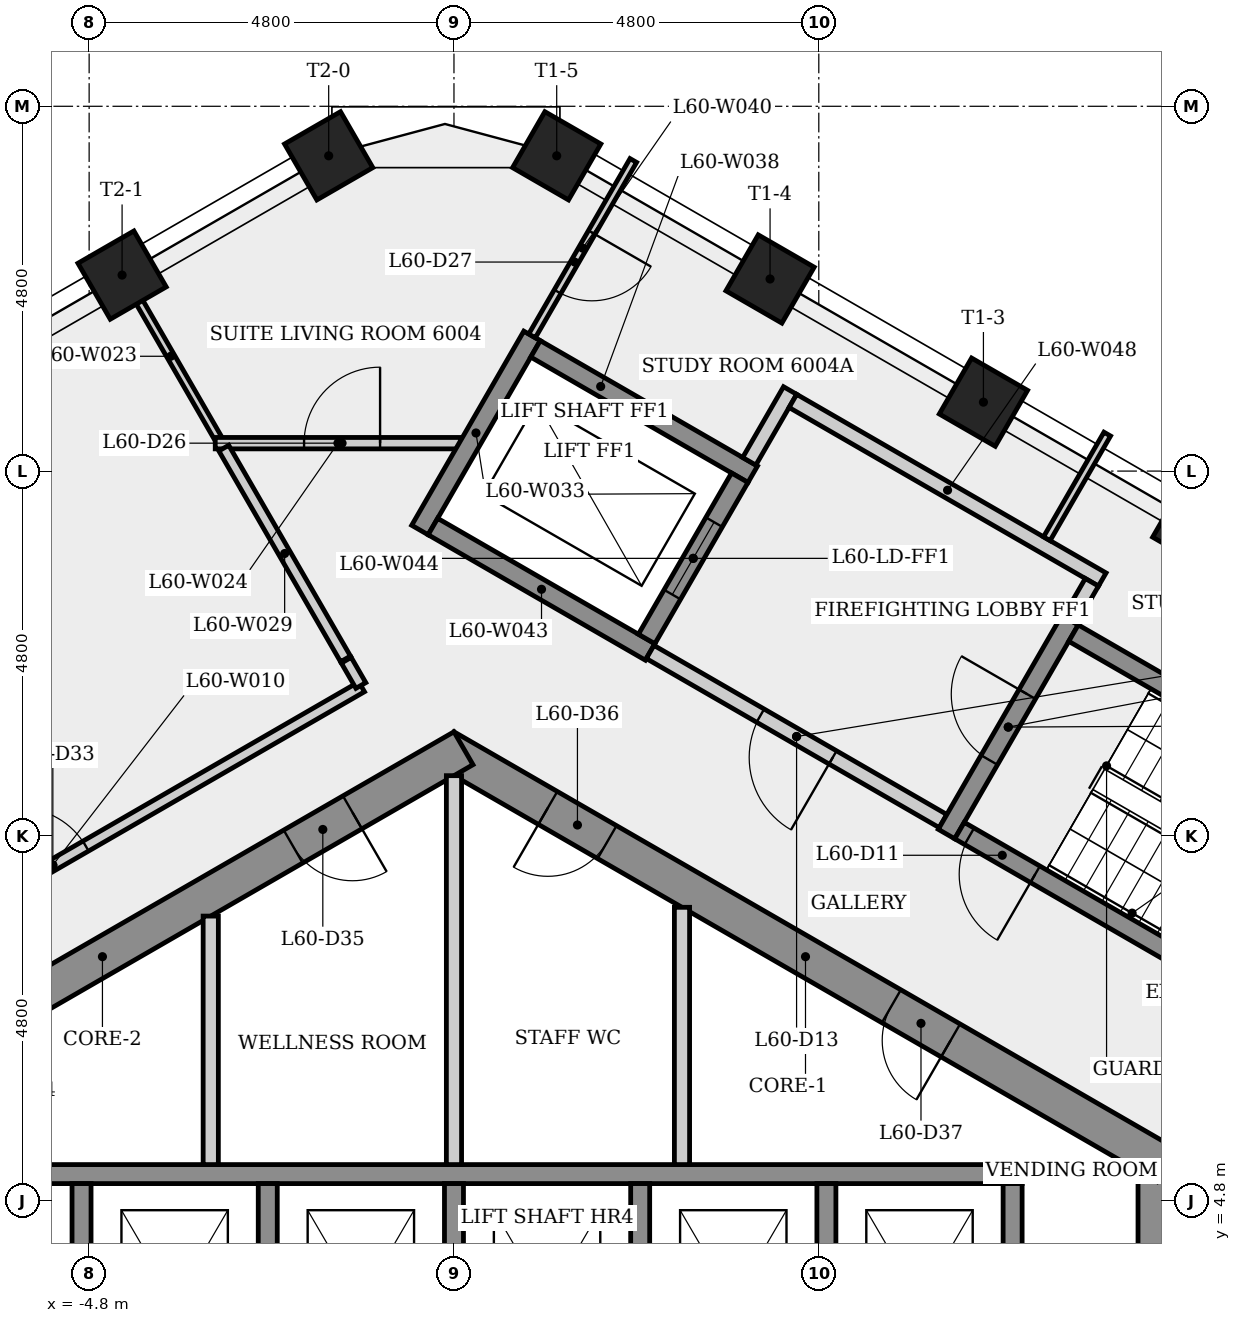
"""IFC4 building model, lengths in metres.
Left out: names, types, materials, properties, quantities, classifications, styles, units other than length and angle.
Written with IfcOpenShell. Run it as: python <this file> out.ifc"""

import sys

from ifc_helpers import new_model, si_unit, direction, frame, frame_2d, origin, origin_2d, place, context, subcontext, project, spatial, rectangle, extrude, element, fill, save


model = new_model("IFC4")
c1 = context("Model", 3, precision=1e-05, world=origin(), true_north=direction((0.0, 1.0)))
c2 = subcontext(c1, "Body", "Model", "MODEL_VIEW")
j1 = project(units=[si_unit("LENGTHUNIT", "METRE"), si_unit("PLANEANGLEUNIT", "RADIAN")], contexts=[c1])
p1 = place(None, origin())
s1 = spatial("IfcSite", under=j1, at=p1, CompositionType="ELEMENT")
p2 = place(p1, origin())
s2 = spatial("IfcBuilding", under=s1, at=p2, CompositionType="ELEMENT")
p3 = place(p2, frame((0.0, 0.0, 225.7)))
s3 = spatial("IfcBuildingStorey", under=s2, at=p3, CompositionType="ELEMENT", Elevation=225.7)
p4 = place(p3, frame((9.25, -5.485, 0.0), z_axis=(0.0, 0.0, 1.0), x_axis=(0.0, 1.0, 0.0)))
e1 = element("IfcWall", 1, at=p4, inside=s3, PredefinedType="SHEAR", context=c2, shape_type="SweptSolid", body=[
    extrude(rectangle(XDim=10.97, YDim=0.5, at=frame_2d((5.485, 0.0))), origin(), (0.0, 0.0, 1.0), 3.4),
])
p5 = place(p4, frame((4.685, 0.0, 0.0)))
e2 = element("IfcOpeningElement", 2, at=p5, cuts=e1, PredefinedType="OPENING", context=c2, shape_type="SweptSolid", body=[
    extrude(rectangle(XDim=1.6, YDim=2.1, at=frame_2d((0.8, 1.05))), frame((0.0, 0.26, 0.0), z_axis=(0.0, -1.0, 0.0), x_axis=(1.0, 0.0, 0.0)), (0.0, 0.0, 1.0), 0.52),
])
p6 = place(p3, frame((9.375, 5.268, 0.0), z_axis=(0.0, 0.0, 1.0), x_axis=(-0.866023993627, 0.500002442456, 0.0)))
e3 = element("IfcWall", 3, at=p6, inside=s3, PredefinedType="SHEAR", context=c2, shape_type="SweptSolid", body=[
    extrude(rectangle(XDim=10.97, YDim=0.5, at=frame_2d((5.485, 0.0))), origin(), (0.0, 0.0, 1.0), 3.4),
])
p7 = place(p6, frame((8.5, 0.0, 0.0)))
e4 = element("IfcOpeningElement", 4, at=p7, cuts=e3, PredefinedType="OPENING", context=c2, shape_type="SweptSolid", body=[
    extrude(rectangle(XDim=0.9, YDim=2.1, at=frame_2d((0.45, 1.05))), frame((0.0, 0.26, 0.0), z_axis=(0.0, -1.0, 0.0), x_axis=(1.0, 0.0, 0.0)), (0.0, 0.0, 1.0), 0.52),
])
p8 = place(p6, frame((3.28, 0.0, 0.0)))
e5 = element("IfcOpeningElement", 5, at=p8, cuts=e3, PredefinedType="OPENING", context=c2, shape_type="SweptSolid", body=[
    extrude(rectangle(XDim=0.9, YDim=2.1, at=frame_2d((0.45, 1.05))), frame((0.0, 0.26, 0.0), z_axis=(0.0, -1.0, 0.0), x_axis=(1.0, 0.0, 0.0)), (0.0, 0.0, 1.0), 0.52),
])
p9 = place(p3, frame((0.125, 10.753, 0.0), z_axis=(0.0, 0.0, 1.0), x_axis=(-0.866023993627, -0.500002442456, 0.0)))
e6 = element("IfcWall", 6, at=p9, inside=s3, PredefinedType="SHEAR", context=c2, shape_type="SweptSolid", body=[
    extrude(rectangle(XDim=10.97, YDim=0.5, at=frame_2d((5.485, 0.0))), origin(), (0.0, 0.0, 1.0), 3.4),
])
p10 = place(p9, frame((8.581, 0.0, 0.0)))
e7 = element("IfcOpeningElement", 7, at=p10, cuts=e6, PredefinedType="OPENING", context=c2, shape_type="SweptSolid", body=[
    extrude(rectangle(XDim=0.9, YDim=2.1, at=frame_2d((0.45, 1.05))), frame((0.0, 0.26, 0.0), z_axis=(0.0, -1.0, 0.0), x_axis=(1.0, 0.0, 0.0)), (0.0, 0.0, 1.0), 0.52),
])
p11 = place(p9, frame((1.687, 0.0, 0.0)))
e8 = element("IfcOpeningElement", 8, at=p11, cuts=e6, PredefinedType="OPENING", context=c2, shape_type="SweptSolid", body=[
    extrude(rectangle(XDim=0.9, YDim=2.1, at=frame_2d((0.45, 1.05))), frame((0.0, 0.26, 0.0), z_axis=(0.0, -1.0, 0.0), x_axis=(1.0, 0.0, 0.0)), (0.0, 0.0, 1.0), 0.52),
])
for number, where, z_axis, x_axis in (
    (9, (9.773, 13.686, 0.0), (0.0, 0.0, 1.0), (0.5, 0.866, 0.0)),
    (10, (6.966, 15.307, 0.0), (0.0, 0.0, 1.0), (0.5, 0.866, 0.0)),
    (11, (4.159, 16.927, 0.0), (0.0, 0.0, 1.0), (0.5, 0.866, 0.0)),
    (12, (1.352, 18.548, 0.0), (0.0, 0.0, 1.0), (0.5, 0.866, 0.0)),
    (13, (-1.648, 18.548, 0.0), (0.0, 0.0, 1.0), (-0.5, 0.866, 0.0)),
    (14, (-4.366, 16.979, 0.0), (0.0, 0.0, 1.0), (-0.5, 0.866, 0.0)),
):
    element("IfcColumn", number, at=place(p3, frame(where, z_axis=z_axis, x_axis=x_axis)), inside=s3, PredefinedType="COLUMN", context=c2, shape_type="SweptSolid", body=[
        extrude(rectangle(XDim=0.85, YDim=0.85, at=origin_2d()), origin(), (0.0, 0.0, 1.0), 3.4),
    ])
p12 = place(p3, frame((-9.34, 6.87, 0.0), z_axis=(0.0, 0.0, 1.0), x_axis=(0.866023086118, 0.500004014295, 0.0)))
e15 = element("IfcWall", 15, at=p12, inside=s3, PredefinedType="PARTITIONING", context=c2, shape_type="SweptSolid", body=[
    extrude(rectangle(XDim=9.382, YDim=0.15, at=frame_2d((4.691, 0.0))), origin(), (0.0, 0.0, 1.0), 3.05),
])
p13 = place(p12, frame((4.191, 0.0, 0.0)))
e16 = element("IfcOpeningElement", 16, at=p13, cuts=e15, PredefinedType="OPENING", context=c2, shape_type="SweptSolid", body=[
    extrude(rectangle(XDim=1.0, YDim=2.1, at=frame_2d((0.5, 1.05))), frame((0.0, 0.085, 0.0), z_axis=(0.0, -1.0, 0.0), x_axis=(1.0, 0.0, 0.0)), (0.0, 0.0, 1.0), 0.17),
])
p14 = place(p3, frame((-7.225, 5.15, 0.0), z_axis=(0.0, 0.0, 1.0), x_axis=(1.0, 0.0, 0.0)))
e17 = element("IfcWall", 17, at=p14, inside=s3, PredefinedType="SHEAR", context=c2, shape_type="SweptSolid", body=[
    extrude(rectangle(XDim=14.7, YDim=0.25, at=frame_2d((7.35, 0.0))), origin(), (0.0, 0.0, 1.0), 3.05),
])
p15 = place(p3, frame((-4.9, 5.025, 0.0), z_axis=(0.0, 0.0, 1.0), x_axis=(0.0, -1.0, 0.0)))
e18 = element("IfcWall", 18, at=p15, inside=s3, PredefinedType="SHEAR", context=c2, shape_type="SweptSolid", body=[
    extrude(rectangle(XDim=3.1, YDim=0.25, at=frame_2d((1.55, 0.0))), origin(), (0.0, 0.0, 1.0), 3.4),
])
p16 = place(p3, frame((-3.2, 8.545, 0.0), z_axis=(0.0, 0.0, 1.0), x_axis=(0.0, -1.0, 0.0)))
e19 = element("IfcWall", 19, at=p16, inside=s3, PredefinedType="PARTITIONING", context=c2, shape_type="SweptSolid", body=[
    extrude(rectangle(XDim=3.27, YDim=0.2, at=frame_2d((1.635, 0.0))), origin(), (0.0, 0.0, 1.0), 3.05),
])
p17 = place(p3, frame((-3.104, 14.832, 0.0), z_axis=(0.0, 0.0, 1.0), x_axis=(-0.499934593286, 0.866063163075, 0.0)))
e20 = element("IfcWall", 20, at=p17, inside=s3, PredefinedType="PARTITIONING", context=c2, shape_type="SweptSolid", body=[
    extrude(rectangle(XDim=2.49, YDim=0.1, at=frame_2d((1.245, 0.0))), origin(), (0.0, 0.0, 1.0), 3.05),
])
p18 = place(p3, frame((-3.141, 14.767, 0.0), z_axis=(0.0, 0.0, 1.0), x_axis=(1.0, 0.0, 0.0)))
e21 = element("IfcWall", 21, at=p18, inside=s3, PredefinedType="PARTITIONING", context=c2, shape_type="SweptSolid", body=[
    extrude(rectangle(XDim=3.228, YDim=0.15, at=frame_2d((1.614, 0.0))), origin(), (0.0, 0.0, 1.0), 3.05),
])
p19 = place(p18, frame((1.169, 0.0, 0.0)))
e22 = element("IfcOpeningElement", 22, at=p19, cuts=e21, PredefinedType="OPENING", context=c2, shape_type="SweptSolid", body=[
    extrude(rectangle(XDim=1.0, YDim=2.1, at=frame_2d((0.5, 1.05))), frame((0.0, 0.085, 0.0), z_axis=(0.0, -1.0, 0.0), x_axis=(1.0, 0.0, 0.0)), (0.0, 0.0, 1.0), 0.17),
])
p20 = place(p3, frame((-2.45, 5.025, 0.0), z_axis=(0.0, 0.0, 1.0), x_axis=(0.0, -1.0, 0.0)))
e23 = element("IfcWall", 23, at=p20, inside=s3, PredefinedType="SHEAR", context=c2, shape_type="SweptSolid", body=[
    extrude(rectangle(XDim=3.1, YDim=0.25, at=frame_2d((1.55, 0.0))), origin(), (0.0, 0.0, 1.0), 3.4),
])
p21 = place(p3, frame((-1.427, 11.928, 0.0), z_axis=(0.0, 0.0, 1.0), x_axis=(-0.499951191736, 0.866053581415, 0.0)))
e24 = element("IfcWall", 24, at=p21, inside=s3, PredefinedType="PARTITIONING", context=c2, shape_type="SweptSolid", body=[
    extrude(rectangle(XDim=3.203, YDim=0.15, at=frame_2d((1.602, 0.0))), origin(), (0.0, 0.0, 1.0), 3.05),
])
p22 = place(p3, frame((-1.417, 11.911, 0.0), z_axis=(0.0, 0.0, 1.0), x_axis=(0.500107979177, -0.865963053002, 0.0)))
e25 = element("IfcWall", 25, at=p22, inside=s3, PredefinedType="PARTITIONING", context=c2, shape_type="SweptSolid", body=[
    extrude(rectangle(XDim=0.384, YDim=0.15, at=frame_2d((0.192, 0.0))), origin(), (0.0, 0.0, 1.0), 3.05),
])
p23 = place(p3, frame((-0.448, 13.624, 0.0), z_axis=(0.0, 0.0, 1.0), x_axis=(0.500037662692, 0.866003658127, 0.0)))
e26 = element("IfcWall", 26, at=p23, inside=s3, PredefinedType="SHEAR", context=c2, shape_type="SweptSolid", body=[
    extrude(rectangle(XDim=2.95, YDim=0.25, at=frame_2d((1.475, 0.0))), origin(), (0.0, 0.0, 1.0), 3.05),
])
p24 = place(p3, frame((0.0, 5.025, 0.0), z_axis=(0.0, 0.0, 1.0), x_axis=(0.0, -1.0, 0.0)))
e27 = element("IfcWall", 27, at=p24, inside=s3, PredefinedType="SHEAR", context=c2, shape_type="SweptSolid", body=[
    extrude(rectangle(XDim=3.1, YDim=0.25, at=frame_2d((1.55, 0.0))), origin(), (0.0, 0.0, 1.0), 3.4),
])
p25 = place(p3, frame((0.0, 10.392, 0.0), z_axis=(0.0, 0.0, 1.0), x_axis=(0.0, -1.0, 0.0)))
e28 = element("IfcWall", 28, at=p25, inside=s3, PredefinedType="PARTITIONING", context=c2, shape_type="SweptSolid", body=[
    extrude(rectangle(XDim=5.117, YDim=0.2, at=frame_2d((2.559, 0.0))), origin(), (0.0, 0.0, 1.0), 3.05),
])
p26 = place(p3, frame((1.073, 16.008, 0.0), z_axis=(0.0, 0.0, 1.0), x_axis=(0.866040211805, -0.499974350878, 0.0)))
e29 = element("IfcWall", 29, at=p26, inside=s3, PredefinedType="SHEAR", context=c2, shape_type="SweptSolid", body=[
    extrude(rectangle(XDim=3.3, YDim=0.25, at=frame_2d((1.65, 0.0))), origin(), (0.0, 0.0, 1.0), 3.05),
])
p27 = place(p3, frame((2.36, 18.487, 0.0), z_axis=(0.0, 0.0, 1.0), x_axis=(-0.500021155841, -0.86601318911, 0.0)))
e30 = element("IfcWall", 30, at=p27, inside=s3, PredefinedType="PARTITIONING", context=c2, shape_type="SweptSolid", body=[
    extrude(rectangle(XDim=2.665, YDim=0.1, at=frame_2d((1.333, 0.0))), origin(), (0.0, 0.0, 1.0), 3.05),
])
p28 = place(p27, frame((1.093, 0.0, 0.0)))
e31 = element("IfcOpeningElement", 31, at=p28, cuts=e30, PredefinedType="OPENING", context=c2, shape_type="SweptSolid", body=[
    extrude(rectangle(XDim=0.9, YDim=2.1, at=frame_2d((0.45, 1.05))), frame((0.0, 0.06, 0.0), z_axis=(0.0, -1.0, 0.0), x_axis=(1.0, 0.0, 0.0)), (0.0, 0.0, 1.0), 0.12),
])
p29 = place(p3, frame((2.45, 5.025, 0.0), z_axis=(0.0, 0.0, 1.0), x_axis=(0.0, -1.0, 0.0)))
e32 = element("IfcWall", 32, at=p29, inside=s3, PredefinedType="SHEAR", context=c2, shape_type="SweptSolid", body=[
    extrude(rectangle(XDim=3.1, YDim=0.25, at=frame_2d((1.55, 0.0))), origin(), (0.0, 0.0, 1.0), 3.4),
])
p30 = place(p3, frame((2.581, 12.02, 0.0), z_axis=(0.0, 0.0, 1.0), x_axis=(-0.866040211805, 0.499974350878, 0.0)))
e33 = element("IfcWall", 33, at=p30, inside=s3, PredefinedType="SHEAR", context=c2, shape_type="SweptSolid", body=[
    extrude(rectangle(XDim=3.3, YDim=0.25, at=frame_2d((1.65, 0.0))), origin(), (0.0, 0.0, 1.0), 3.05),
])
p31 = place(p3, frame((2.535, 12.191, 0.0), z_axis=(0.0, 0.0, 1.0), x_axis=(0.500061746146, 0.865989751695, 0.0)))
e34 = element("IfcWall", 34, at=p31, inside=s3, PredefinedType="SHEAR", context=c2, shape_type="SweptSolid", body=[
    extrude(rectangle(XDim=2.45, YDim=0.25, at=frame_2d((1.225, 0.0))), origin(), (0.0, 0.0, 1.0), 3.4),
])
p32 = place(p31, frame((0.675, 0.0, 0.0)))
e35 = element("IfcOpeningElement", 35, at=p32, cuts=e34, PredefinedType="OPENING", context=c2, shape_type="SweptSolid", body=[
    extrude(rectangle(XDim=1.1, YDim=2.1, at=frame_2d((0.55, 1.05))), frame((0.0, 0.135, 0.0), z_axis=(0.0, -1.0, 0.0), x_axis=(1.0, 0.0, 0.0)), (0.0, 0.0, 1.0), 0.27),
])
p33 = place(p3, frame((3.0, 8.66, 0.0), z_axis=(0.0, 0.0, 1.0), x_axis=(0.0, -1.0, 0.0)))
e36 = element("IfcWall", 36, at=p33, inside=s3, PredefinedType="PARTITIONING", context=c2, shape_type="SweptSolid", body=[
    extrude(rectangle(XDim=3.385, YDim=0.2, at=frame_2d((1.693, 0.0))), origin(), (0.0, 0.0, 1.0), 3.05),
])
p34 = place(p3, frame((3.885, 14.529, 0.0), z_axis=(0.0, 0.0, 1.0), x_axis=(0.499997628298, 0.866026773083, 0.0)))
e37 = element("IfcWall", 37, at=p34, inside=s3, PredefinedType="PARTITIONING", context=c2, shape_type="SweptSolid", body=[
    extrude(rectangle(XDim=1.075, YDim=0.2, at=frame_2d((0.538, 0.0))), origin(), (0.0, 0.0, 1.0), 3.05),
])
p35 = place(p3, frame((4.459, 15.323, 0.0), z_axis=(0.0, 0.0, 1.0), x_axis=(0.866016039709, -0.500016218704, 0.0)))
e38 = element("IfcWall", 38, at=p35, inside=s3, PredefinedType="PARTITIONING", context=c2, shape_type="SweptSolid", body=[
    extrude(rectangle(XDim=4.7, YDim=0.2, at=frame_2d((2.35, 0.0))), origin(), (0.0, 0.0, 1.0), 3.05),
])
p36 = place(p3, frame((4.9, 5.025, 0.0), z_axis=(0.0, 0.0, 1.0), x_axis=(0.0, -1.0, 0.0)))
e39 = element("IfcWall", 39, at=p36, inside=s3, PredefinedType="SHEAR", context=c2, shape_type="SweptSolid", body=[
    extrude(rectangle(XDim=3.1, YDim=0.25, at=frame_2d((1.55, 0.0))), origin(), (0.0, 0.0, 1.0), 3.4),
])
p37 = place(p3, frame((6.435, 9.795, 0.0), z_axis=(0.0, 0.0, 1.0), x_axis=(-0.866012907634, 0.500021643343, 0.0)))
e40 = element("IfcWall", 40, at=p37, inside=s3, PredefinedType="PARTITIONING", context=c2, shape_type="SweptSolid", body=[
    extrude(rectangle(XDim=4.45, YDim=0.2, at=frame_2d((2.225, 0.0))), origin(), (0.0, 0.0, 1.0), 3.05),
])
p38 = place(p37, frame((1.675, 0.0, 0.0)))
e41 = element("IfcOpeningElement", 41, at=p38, cuts=e40, PredefinedType="OPENING", context=c2, shape_type="SweptSolid", body=[
    extrude(rectangle(XDim=1.1, YDim=2.1, at=frame_2d((0.55, 1.05))), frame((0.0, 0.11, 0.0), z_axis=(0.0, -1.0, 0.0), x_axis=(1.0, 0.0, 0.0)), (0.0, 0.0, 1.0), 0.22),
])
p39 = place(p3, frame((6.48, 9.624, 0.0), z_axis=(0.0, 0.0, 1.0), x_axis=(0.500017246033, 0.866015446554, 0.0)))
e42 = element("IfcWall", 42, at=p39, inside=s3, PredefinedType="SHEAR", context=c2, shape_type="SweptSolid", body=[
    extrude(rectangle(XDim=3.25, YDim=0.25, at=frame_2d((1.625, 0.0))), origin(), (0.0, 0.0, 1.0), 3.05),
])
p40 = place(p39, frame((1.125, 0.0, 0.0)))
e43 = element("IfcOpeningElement", 43, at=p40, cuts=e42, PredefinedType="OPENING", context=c2, shape_type="SweptSolid", body=[
    extrude(rectangle(XDim=1.0, YDim=2.1, at=frame_2d((0.5, 1.05))), frame((0.0, 0.135, 0.0), z_axis=(0.0, -1.0, 0.0), x_axis=(1.0, 0.0, 0.0)), (0.0, 0.0, 1.0), 0.27),
])
p41 = place(p3, frame((7.35, 5.025, 0.0), z_axis=(0.0, 0.0, 1.0), x_axis=(0.0, -1.0, 0.0)))
e44 = element("IfcWall", 44, at=p41, inside=s3, PredefinedType="SHEAR", context=c2, shape_type="SweptSolid", body=[
    extrude(rectangle(XDim=3.1, YDim=0.25, at=frame_2d((1.55, 0.0))), origin(), (0.0, 0.0, 1.0), 3.4),
])
p42 = place(p3, frame((7.8, 13.51, 0.0), z_axis=(0.0, 0.0, 1.0), x_axis=(0.500037068326, 0.866004001318, 0.0)))
e45 = element("IfcWall", 45, at=p42, inside=s3, PredefinedType="PARTITIONING", context=c2, shape_type="SweptSolid", body=[
    extrude(rectangle(XDim=1.59, YDim=0.1, at=frame_2d((0.795, 0.0))), origin(), (0.0, 0.0, 1.0), 3.05),
])
p43 = place(p3, frame((8.151, 12.268, 0.0), z_axis=(0.0, 0.0, 1.0), x_axis=(0.866025499775, -0.499999833739, 0.0)))
e46 = element("IfcWall", 46, at=p43, inside=s3, PredefinedType="SHEAR", context=c2, shape_type="SweptSolid", body=[
    extrude(rectangle(XDim=6.4, YDim=0.25, at=frame_2d((3.2, 0.0))), origin(), (0.0, 0.0, 1.0), 3.05),
])
p44 = place(p3, frame((8.393, 12.937, 0.0), z_axis=(0.0, 0.0, 1.0), x_axis=(-0.500065409566, -0.86598763626, 0.0)))
e47 = element("IfcWall", 47, at=p44, inside=s3, PredefinedType="PARTITIONING", context=c2, shape_type="SweptSolid", body=[
    extrude(rectangle(XDim=0.575, YDim=0.2, at=frame_2d((0.288, 0.0))), origin(), (0.0, 0.0, 1.0), 3.05),
])
p45 = place(p3, frame((12.194, 6.47, 0.0), z_axis=(0.0, 0.0, 1.0), x_axis=(-0.866025499775, 0.499999833739, 0.0)))
e48 = element("IfcWall", 48, at=p45, inside=s3, PredefinedType="SHEAR", context=c2, shape_type="SweptSolid", body=[
    extrude(rectangle(XDim=6.4, YDim=0.25, at=frame_2d((3.2, 0.0))), origin(), (0.0, 0.0, 1.0), 3.05),
])
p46 = place(p45, frame((5.25, 0.0, 0.0)))
e49 = element("IfcOpeningElement", 49, at=p46, cuts=e48, PredefinedType="OPENING", context=c2, shape_type="SweptSolid", body=[
    extrude(rectangle(XDim=1.0, YDim=2.1, at=frame_2d((0.5, 1.05))), frame((0.0, 0.135, 0.0), z_axis=(0.0, -1.0, 0.0), x_axis=(1.0, 0.0, 0.0)), (0.0, 0.0, 1.0), 0.27),
])
p47 = place(p46, origin())
e50 = element("IfcDoor", 50, at=p47, inside=s3, OperationType="SINGLE_SWING_LEFT", PredefinedType="DOOR", context=c2, shape_type="SweptSolid", body=[
    extrude(rectangle(XDim=1.0, YDim=2.1, at=frame_2d((0.5, 1.05))), frame((0.0, 0.025, 0.0), z_axis=(0.0, -1.0, 0.0), x_axis=(1.0, 0.0, 0.0)), (0.0, 0.0, 1.0), 0.05),
])
fill(e49, e50)
p48 = place(p40, origin())
e51 = element("IfcDoor", 51, at=p48, inside=s3, OperationType="SINGLE_SWING_RIGHT", PredefinedType="DOOR", context=c2, shape_type="SweptSolid", body=[
    extrude(rectangle(XDim=1.0, YDim=2.1, at=frame_2d((0.5, 1.05))), frame((0.0, 0.025, 0.0), z_axis=(0.0, -1.0, 0.0), x_axis=(1.0, 0.0, 0.0)), (0.0, 0.0, 1.0), 0.05),
])
fill(e43, e51)
p49 = place(p38, origin())
e52 = element("IfcDoor", 52, at=p49, inside=s3, OperationType="SINGLE_SWING_LEFT", PredefinedType="DOOR", context=c2, shape_type="SweptSolid", body=[
    extrude(rectangle(XDim=1.1, YDim=2.1, at=frame_2d((0.55, 1.05))), frame((0.0, 0.025, 0.0), z_axis=(0.0, -1.0, 0.0), x_axis=(1.0, 0.0, 0.0)), (0.0, 0.0, 1.0), 0.05),
])
fill(e41, e52)
p50 = place(p32, origin())
e53 = element("IfcDoor", 53, at=p50, inside=s3, OperationType="SLIDING_TO_LEFT", PredefinedType="DOOR", context=c2, shape_type="SweptSolid", body=[
    extrude(rectangle(XDim=1.1, YDim=2.1, at=frame_2d((0.55, 1.05))), frame((0.0, 0.025, 0.0), z_axis=(0.0, -1.0, 0.0), x_axis=(1.0, 0.0, 0.0)), (0.0, 0.0, 1.0), 0.05),
])
fill(e35, e53)
p51 = place(p19, origin())
e54 = element("IfcDoor", 54, at=p51, inside=s3, OperationType="SINGLE_SWING_RIGHT", PredefinedType="DOOR", context=c2, shape_type="SweptSolid", body=[
    extrude(rectangle(XDim=1.0, YDim=2.1, at=frame_2d((0.5, 1.05))), frame((0.0, 0.025, 0.0), z_axis=(0.0, -1.0, 0.0), x_axis=(1.0, 0.0, 0.0)), (0.0, 0.0, 1.0), 0.05),
])
fill(e22, e54)
p52 = place(p28, origin())
e55 = element("IfcDoor", 55, at=p52, inside=s3, OperationType="SINGLE_SWING_LEFT", PredefinedType="DOOR", context=c2, shape_type="SweptSolid", body=[
    extrude(rectangle(XDim=0.9, YDim=2.1, at=frame_2d((0.45, 1.05))), frame((0.0, 0.025, 0.0), z_axis=(0.0, -1.0, 0.0), x_axis=(1.0, 0.0, 0.0)), (0.0, 0.0, 1.0), 0.05),
])
fill(e31, e55)
p53 = place(p13, origin())
e56 = element("IfcDoor", 56, at=p53, inside=s3, OperationType="SINGLE_SWING_LEFT", PredefinedType="DOOR", context=c2, shape_type="SweptSolid", body=[
    extrude(rectangle(XDim=1.0, YDim=2.1, at=frame_2d((0.5, 1.05))), frame((0.0, 0.025, 0.0), z_axis=(0.0, -1.0, 0.0), x_axis=(1.0, 0.0, 0.0)), (0.0, 0.0, 1.0), 0.05),
])
fill(e16, e56)
p54 = place(p11, origin())
e57 = element("IfcDoor", 57, at=p54, inside=s3, OperationType="SINGLE_SWING_LEFT", PredefinedType="DOOR", context=c2, shape_type="SweptSolid", body=[
    extrude(rectangle(XDim=0.9, YDim=2.1, at=frame_2d((0.45, 1.05))), frame((0.0, 0.025, 0.0), z_axis=(0.0, -1.0, 0.0), x_axis=(1.0, 0.0, 0.0)), (0.0, 0.0, 1.0), 0.05),
])
fill(e8, e57)
p55 = place(p7, origin())
e58 = element("IfcDoor", 58, at=p55, inside=s3, OperationType="SINGLE_SWING_RIGHT", PredefinedType="DOOR", context=c2, shape_type="SweptSolid", body=[
    extrude(rectangle(XDim=0.9, YDim=2.1, at=frame_2d((0.45, 1.05))), frame((0.0, 0.025, 0.0), z_axis=(0.0, -1.0, 0.0), x_axis=(1.0, 0.0, 0.0)), (0.0, 0.0, 1.0), 0.05),
])
fill(e4, e58)
p56 = place(p8, origin())
e59 = element("IfcDoor", 59, at=p56, inside=s3, OperationType="SINGLE_SWING_LEFT", PredefinedType="DOOR", context=c2, shape_type="SweptSolid", body=[
    extrude(rectangle(XDim=0.9, YDim=2.1, at=frame_2d((0.45, 1.05))), frame((0.0, 0.025, 0.0), z_axis=(0.0, -1.0, 0.0), x_axis=(1.0, 0.0, 0.0)), (0.0, 0.0, 1.0), 0.05),
])
fill(e5, e59)
save(model, sys.argv[1])
